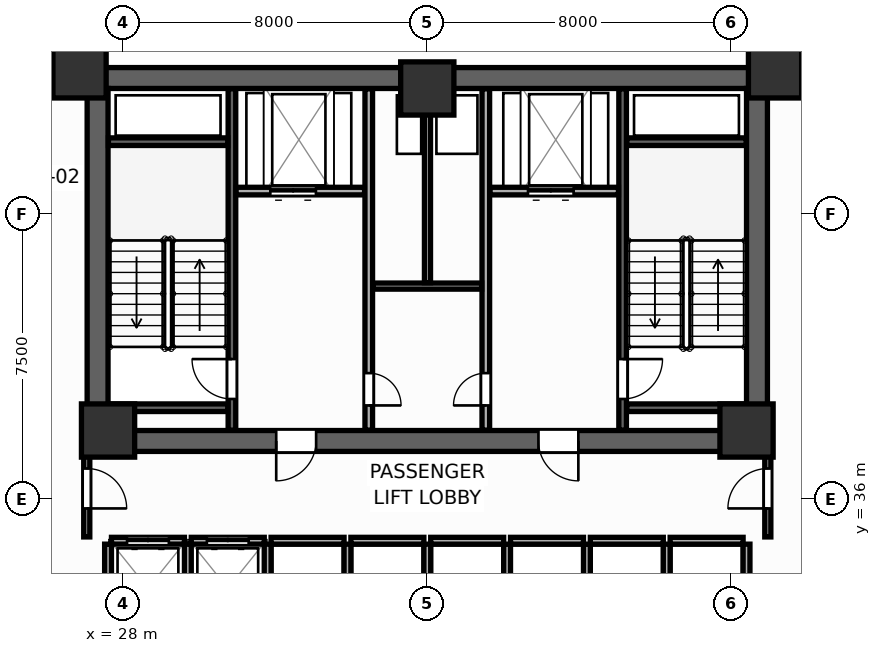
"""IFC4 building model, lengths in metres.
Left out: names, types, materials, properties, quantities, classifications, styles, units other than length and angle.
Written with IfcOpenShell. Run it as: python <this file> out.ifc"""

import sys

from ifc_helpers import new_model, si_unit, direction, frame, frame_2d, origin, origin_2d, place, context, subcontext, project, spatial, rectangle, extrude, source, transform, mapped, element, fill, save


model = new_model("IFC4")
c1 = context("Model", 3, precision=1e-05, world=origin(), true_north=direction((0.0, 1.0)))
c2 = subcontext(c1, "Body", "Model", "MODEL_VIEW")
j1 = project(units=[si_unit("LENGTHUNIT", "METRE"), si_unit("PLANEANGLEUNIT", "RADIAN")], contexts=[c1])
p1 = place(None, origin())
s1 = spatial("IfcSite", under=j1, at=p1, CompositionType="ELEMENT")
p2 = place(p1, origin())
s2 = spatial("IfcBuilding", under=s1, at=p2, CompositionType="ELEMENT")
p3 = place(p2, frame((0.0, 0.0, 43.5)))
s3 = spatial("IfcBuildingStorey", under=s2, at=p3, CompositionType="ELEMENT", Elevation=43.5)
p4 = place(p3, frame((27.05, 47.075, 0.0), z_axis=(0.0, 0.0, 1.0), x_axis=(1.0, 0.0, 0.0)))
e1 = element("IfcWall", 1, at=p4, inside=s3, PredefinedType="SHEAR", context=c2, shape_type="SweptSolid", body=[
    extrude(rectangle(XDim=17.9, YDim=0.55, at=frame_2d((8.95, 0.0))), origin(), (0.0, 0.0, 1.0), 3.9),
])
p5 = place(p3, frame((27.05, 37.525, 0.0), z_axis=(0.0, 0.0, 1.0), x_axis=(1.0, 0.0, 0.0)))
e2 = element("IfcWall", 2, at=p5, inside=s3, PredefinedType="SHEAR", context=c2, shape_type="SweptSolid", body=[
    extrude(rectangle(XDim=17.9, YDim=0.55, at=frame_2d((8.95, 0.0))), origin(), (0.0, 0.0, 1.0), 3.9),
])
p6 = place(p5, frame((4.975, 0.0, 0.0)))
e3 = element("IfcOpeningElement", 3, at=p6, cuts=e2, PredefinedType="OPENING", context=c2, shape_type="SweptSolid", body=[
    extrude(rectangle(XDim=1.05, YDim=2.1, at=frame_2d((0.525, 1.05))), frame((0.0, 0.285, 0.0), z_axis=(0.0, -1.0, 0.0), x_axis=(1.0, 0.0, 0.0)), (0.0, 0.0, 1.0), 0.57),
])
p7 = place(p5, frame((11.875, 0.0, 0.0)))
e4 = element("IfcOpeningElement", 4, at=p7, cuts=e2, PredefinedType="OPENING", context=c2, shape_type="SweptSolid", body=[
    extrude(rectangle(XDim=1.05, YDim=2.1, at=frame_2d((0.525, 1.05))), frame((0.0, 0.285, 0.0), z_axis=(0.0, -1.0, 0.0), x_axis=(1.0, 0.0, 0.0)), (0.0, 0.0, 1.0), 0.57),
])
for number, where, z_axis, x_axis in (
    (5, (27.325, 37.8, 0.0), (0.0, 0.0, 1.0), (0.0, 1.0, 0.0)),
    (6, (44.675, 37.8, 0.0), (0.0, 0.0, 1.0), (0.0, 1.0, 0.0)),
):
    element("IfcWall", number, at=place(p3, frame(where, z_axis=z_axis, x_axis=x_axis)), inside=s3, PredefinedType="SHEAR", context=c2, shape_type="SweptSolid", body=[
        extrude(rectangle(XDim=9.0, YDim=0.55, at=frame_2d((4.5, 0.0))), origin(), (0.0, 0.0, 1.0), 3.9),
    ])
m1 = source(origin(), c2, "Body", "SweptSolid", [
    extrude(rectangle(XDim=1.4, YDim=1.4, at=origin_2d()), origin(), (0.0, 0.0, 1.0), 3.9),
])
for number, where, z_axis, x_axis in (
    (7, (26.85, 47.25, 0.0), (0.0, 0.0, 1.0), (1.0, 0.0, 0.0)),
    (8, (45.15, 47.25, 0.0), (0.0, 0.0, 1.0), (1.0, 0.0, 0.0)),
    (9, (27.6, 37.8, 0.0), (0.0, 0.0, 1.0), (1.0, 0.0, 0.0)),
    (10, (44.4, 37.8, 0.0), (0.0, 0.0, 1.0), (1.0, 0.0, 0.0)),
    (11, (36.0, 46.8, 0.0), (0.0, 0.0, 1.0), (1.0, 0.0, 0.0)),
):
    element("IfcColumn", number, at=place(p3, frame(where, z_axis=z_axis, x_axis=x_axis)), inside=s3, PredefinedType="COLUMN", context=c2, shape_type="MappedRepresentation", body=[
        mapped(m1, transform((0.0, 0.0, 0.0), scale=1.0)),
    ])
p8 = place(p3, frame((30.86, 37.81, 0.0), z_axis=(0.0, 0.0, 1.0), x_axis=(0.0, 1.0, 0.0)))
e12 = element("IfcWall", 12, at=p8, inside=s3, PredefinedType="SHEAR", context=c2, shape_type="SweptSolid", body=[
    extrude(rectangle(XDim=8.98, YDim=0.2, at=frame_2d((4.49, 0.0))), origin(), (0.0, 0.0, 1.0), 3.9),
])
p9 = place(p8, frame((0.82, 0.0, 0.0)))
e13 = element("IfcOpeningElement", 13, at=p9, cuts=e12, PredefinedType="OPENING", context=c2, shape_type="SweptSolid", body=[
    extrude(rectangle(XDim=1.05, YDim=2.1, at=frame_2d((0.525, 1.05))), frame((0.0, 0.11, 0.0), z_axis=(0.0, -1.0, 0.0), x_axis=(1.0, 0.0, 0.0)), (0.0, 0.0, 1.0), 0.22),
])
for number, where, z_axis, x_axis in (
    (14, (27.61, 45.4, 0.0), (0.0, 0.0, 1.0), (1.0, 0.0, 0.0)),
    (15, (27.61, 38.4, 0.0), (0.0, 0.0, 1.0), (1.0, 0.0, 0.0)),
):
    element("IfcWall", number, at=place(p3, frame(where, z_axis=z_axis, x_axis=x_axis)), inside=s3, PredefinedType="SHEAR", context=c2, shape_type="SweptSolid", body=[
        extrude(rectangle(XDim=3.14, YDim=0.2, at=frame_2d((1.57, 0.0))), origin(), (0.0, 0.0, 1.0), 3.9),
    ])
p10 = place(p3, frame((41.14, 37.81, 0.0), z_axis=(0.0, 0.0, 1.0), x_axis=(0.0, 1.0, 0.0)))
e16 = element("IfcWall", 16, at=p10, inside=s3, PredefinedType="SHEAR", context=c2, shape_type="SweptSolid", body=[
    extrude(rectangle(XDim=8.98, YDim=0.2, at=frame_2d((4.49, 0.0))), origin(), (0.0, 0.0, 1.0), 3.9),
])
p11 = place(p10, frame((0.82, 0.0, 0.0)))
e17 = element("IfcOpeningElement", 17, at=p11, cuts=e16, PredefinedType="OPENING", context=c2, shape_type="SweptSolid", body=[
    extrude(rectangle(XDim=1.05, YDim=2.1, at=frame_2d((0.525, 1.05))), frame((0.0, 0.11, 0.0), z_axis=(0.0, -1.0, 0.0), x_axis=(1.0, 0.0, 0.0)), (0.0, 0.0, 1.0), 0.22),
])
for number, where, z_axis, x_axis in (
    (18, (41.25, 45.4, 0.0), (0.0, 0.0, 1.0), (1.0, 0.0, 0.0)),
    (19, (41.25, 38.4, 0.0), (0.0, 0.0, 1.0), (1.0, 0.0, 0.0)),
):
    element("IfcWall", number, at=place(p3, frame(where, z_axis=z_axis, x_axis=x_axis)), inside=s3, PredefinedType="SHEAR", context=c2, shape_type="SweptSolid", body=[
        extrude(rectangle(XDim=3.14, YDim=0.2, at=frame_2d((1.57, 0.0))), origin(), (0.0, 0.0, 1.0), 3.9),
    ])
p12 = place(p3, frame((30.97, 44.1, 0.0), z_axis=(0.0, 0.0, 1.0), x_axis=(1.0, 0.0, 0.0)))
e20 = element("IfcWall", 20, at=p12, inside=s3, PredefinedType="PARTITIONING", context=c2, shape_type="SweptSolid", body=[
    extrude(rectangle(XDim=3.38, YDim=0.2, at=frame_2d((1.69, 0.0))), origin(), (0.0, 0.0, 1.0), 3.68),
])
p13 = place(p12, frame((0.9, 0.0, 0.0)))
e21 = element("IfcOpeningElement", 21, at=p13, cuts=e20, PredefinedType="OPENING", context=c2, shape_type="SweptSolid", body=[
    extrude(rectangle(XDim=1.2, YDim=2.1, at=frame_2d((0.6, 1.05))), frame((0.0, 0.11, 0.0), z_axis=(0.0, -1.0, 0.0), x_axis=(1.0, 0.0, 0.0)), (0.0, 0.0, 1.0), 0.22),
])
p14 = place(p3, frame((37.65, 44.1, 0.0), z_axis=(0.0, 0.0, 1.0), x_axis=(1.0, 0.0, 0.0)))
e22 = element("IfcWall", 22, at=p14, inside=s3, PredefinedType="PARTITIONING", context=c2, shape_type="SweptSolid", body=[
    extrude(rectangle(XDim=3.38, YDim=0.2, at=frame_2d((1.69, 0.0))), origin(), (0.0, 0.0, 1.0), 3.68),
])
p15 = place(p14, frame((1.0, 0.0, 0.0)))
e23 = element("IfcOpeningElement", 23, at=p15, cuts=e22, PredefinedType="OPENING", context=c2, shape_type="SweptSolid", body=[
    extrude(rectangle(XDim=1.2, YDim=2.1, at=frame_2d((0.6, 1.05))), frame((0.0, 0.11, 0.0), z_axis=(0.0, -1.0, 0.0), x_axis=(1.0, 0.0, 0.0)), (0.0, 0.0, 1.0), 0.22),
])
p16 = place(p3, frame((34.46, 37.81, 0.0), z_axis=(0.0, 0.0, 1.0), x_axis=(0.0, 1.0, 0.0)))
e24 = element("IfcWall", 24, at=p16, inside=s3, PredefinedType="PARTITIONING", context=c2, shape_type="SweptSolid", body=[
    extrude(rectangle(XDim=8.98, YDim=0.2, at=frame_2d((4.49, 0.0))), origin(), (0.0, 0.0, 1.0), 3.68),
])
p17 = place(p16, frame((0.65, 0.0, 0.0)))
e25 = element("IfcOpeningElement", 25, at=p17, cuts=e24, PredefinedType="OPENING", context=c2, shape_type="SweptSolid", body=[
    extrude(rectangle(XDim=0.85, YDim=2.05, at=frame_2d((0.425, 1.025))), frame((0.0, 0.11, 0.0), z_axis=(0.0, -1.0, 0.0), x_axis=(1.0, 0.0, 0.0)), (0.0, 0.0, 1.0), 0.22),
])
p18 = place(p3, frame((37.54, 37.81, 0.0), z_axis=(0.0, 0.0, 1.0), x_axis=(0.0, 1.0, 0.0)))
e26 = element("IfcWall", 26, at=p18, inside=s3, PredefinedType="PARTITIONING", context=c2, shape_type="SweptSolid", body=[
    extrude(rectangle(XDim=8.98, YDim=0.2, at=frame_2d((4.49, 0.0))), origin(), (0.0, 0.0, 1.0), 3.68),
])
p19 = place(p18, frame((0.65, 0.0, 0.0)))
e27 = element("IfcOpeningElement", 27, at=p19, cuts=e26, PredefinedType="OPENING", context=c2, shape_type="SweptSolid", body=[
    extrude(rectangle(XDim=0.85, YDim=2.05, at=frame_2d((0.425, 1.025))), frame((0.0, 0.11, 0.0), z_axis=(0.0, -1.0, 0.0), x_axis=(1.0, 0.0, 0.0)), (0.0, 0.0, 1.0), 0.22),
])
p20 = place(p3, frame((34.57, 41.6, 0.0), z_axis=(0.0, 0.0, 1.0), x_axis=(1.0, 0.0, 0.0)))
e28 = element("IfcWall", 28, at=p20, inside=s3, PredefinedType="PARTITIONING", context=c2, shape_type="SweptSolid", body=[
    extrude(rectangle(XDim=2.86, YDim=0.16, at=frame_2d((1.43, 0.0))), origin(), (0.0, 0.0, 1.0), 3.68),
])
p21 = place(p3, frame((36.005, 41.69, 0.0), z_axis=(0.0, 0.0, 1.0), x_axis=(0.0, 1.0, 0.0)))
e29 = element("IfcWall", 29, at=p21, inside=s3, PredefinedType="PARTITIONING", context=c2, shape_type="SweptSolid", body=[
    extrude(rectangle(XDim=5.1, YDim=0.16, at=frame_2d((2.55, 0.0))), origin(), (0.0, 0.0, 1.0), 3.68),
])
p22 = place(p3, frame((27.69, 34.9, 0.0), z_axis=(0.0, 0.0, 1.0), x_axis=(1.0, 0.0, 0.0)))
e30 = element("IfcWall", 30, at=p22, inside=s3, PredefinedType="PARTITIONING", context=c2, shape_type="SweptSolid", body=[
    extrude(rectangle(XDim=1.92, YDim=0.18, at=frame_2d((0.96, 0.0))), origin(), (0.0, 0.0, 1.0), 3.68),
])
p23 = place(p22, frame((0.41, 0.0, 0.0)))
e31 = element("IfcOpeningElement", 31, at=p23, cuts=e30, PredefinedType="OPENING", context=c2, shape_type="SweptSolid", body=[
    extrude(rectangle(XDim=1.1, YDim=2.1, at=frame_2d((0.55, 1.05))), frame((0.0, 0.1, 0.0), z_axis=(0.0, -1.0, 0.0), x_axis=(1.0, 0.0, 0.0)), (0.0, 0.0, 1.0), 0.2),
])
p24 = place(p3, frame((27.6, 32.49, 0.0), z_axis=(0.0, 0.0, 1.0), x_axis=(0.0, 1.0, 0.0)))
e32 = element("IfcWall", 32, at=p24, inside=s3, PredefinedType="PARTITIONING", context=c2, shape_type="SweptSolid", body=[
    extrude(rectangle(XDim=2.32, YDim=0.18, at=frame_2d((1.16, 0.0))), origin(), (0.0, 0.0, 1.0), 3.68),
])
p25 = place(p3, frame((29.79, 34.9, 0.0), z_axis=(0.0, 0.0, 1.0), x_axis=(1.0, 0.0, 0.0)))
e33 = element("IfcWall", 33, at=p25, inside=s3, PredefinedType="PARTITIONING", context=c2, shape_type="SweptSolid", body=[
    extrude(rectangle(XDim=1.92, YDim=0.18, at=frame_2d((0.96, 0.0))), origin(), (0.0, 0.0, 1.0), 3.68),
])
p26 = place(p25, frame((0.41, 0.0, 0.0)))
e34 = element("IfcOpeningElement", 34, at=p26, cuts=e33, PredefinedType="OPENING", context=c2, shape_type="SweptSolid", body=[
    extrude(rectangle(XDim=1.1, YDim=2.1, at=frame_2d((0.55, 1.05))), frame((0.0, 0.1, 0.0), z_axis=(0.0, -1.0, 0.0), x_axis=(1.0, 0.0, 0.0)), (0.0, 0.0, 1.0), 0.2),
])
p27 = place(p3, frame((29.7, 32.49, 0.0), z_axis=(0.0, 0.0, 1.0), x_axis=(0.0, 1.0, 0.0)))
e35 = element("IfcWall", 35, at=p27, inside=s3, PredefinedType="PARTITIONING", context=c2, shape_type="SweptSolid", body=[
    extrude(rectangle(XDim=2.32, YDim=0.18, at=frame_2d((1.16, 0.0))), origin(), (0.0, 0.0, 1.0), 3.68),
])
p28 = place(p3, frame((31.89, 34.9, 0.0), z_axis=(0.0, 0.0, 1.0), x_axis=(1.0, 0.0, 0.0)))
e36 = element("IfcWall", 36, at=p28, inside=s3, PredefinedType="PARTITIONING", context=c2, shape_type="SweptSolid", body=[
    extrude(rectangle(XDim=1.92, YDim=0.18, at=frame_2d((0.96, 0.0))), origin(), (0.0, 0.0, 1.0), 3.68),
])
p29 = place(p3, frame((31.8, 32.49, 0.0), z_axis=(0.0, 0.0, 1.0), x_axis=(0.0, 1.0, 0.0)))
e37 = element("IfcWall", 37, at=p29, inside=s3, PredefinedType="PARTITIONING", context=c2, shape_type="SweptSolid", body=[
    extrude(rectangle(XDim=2.32, YDim=0.18, at=frame_2d((1.16, 0.0))), origin(), (0.0, 0.0, 1.0), 3.68),
])
p30 = place(p3, frame((33.99, 34.9, 0.0), z_axis=(0.0, 0.0, 1.0), x_axis=(1.0, 0.0, 0.0)))
e38 = element("IfcWall", 38, at=p30, inside=s3, PredefinedType="PARTITIONING", context=c2, shape_type="SweptSolid", body=[
    extrude(rectangle(XDim=1.92, YDim=0.18, at=frame_2d((0.96, 0.0))), origin(), (0.0, 0.0, 1.0), 3.68),
])
p31 = place(p3, frame((33.9, 32.49, 0.0), z_axis=(0.0, 0.0, 1.0), x_axis=(0.0, 1.0, 0.0)))
e39 = element("IfcWall", 39, at=p31, inside=s3, PredefinedType="PARTITIONING", context=c2, shape_type="SweptSolid", body=[
    extrude(rectangle(XDim=2.32, YDim=0.18, at=frame_2d((1.16, 0.0))), origin(), (0.0, 0.0, 1.0), 3.68),
])
p32 = place(p3, frame((36.09, 34.9, 0.0), z_axis=(0.0, 0.0, 1.0), x_axis=(1.0, 0.0, 0.0)))
e40 = element("IfcWall", 40, at=p32, inside=s3, PredefinedType="PARTITIONING", context=c2, shape_type="SweptSolid", body=[
    extrude(rectangle(XDim=1.92, YDim=0.18, at=frame_2d((0.96, 0.0))), origin(), (0.0, 0.0, 1.0), 3.68),
])
p33 = place(p3, frame((36.0, 32.49, 0.0), z_axis=(0.0, 0.0, 1.0), x_axis=(0.0, 1.0, 0.0)))
e41 = element("IfcWall", 41, at=p33, inside=s3, PredefinedType="PARTITIONING", context=c2, shape_type="SweptSolid", body=[
    extrude(rectangle(XDim=2.32, YDim=0.18, at=frame_2d((1.16, 0.0))), origin(), (0.0, 0.0, 1.0), 3.68),
])
p34 = place(p3, frame((38.19, 34.9, 0.0), z_axis=(0.0, 0.0, 1.0), x_axis=(1.0, 0.0, 0.0)))
e42 = element("IfcWall", 42, at=p34, inside=s3, PredefinedType="PARTITIONING", context=c2, shape_type="SweptSolid", body=[
    extrude(rectangle(XDim=1.92, YDim=0.18, at=frame_2d((0.96, 0.0))), origin(), (0.0, 0.0, 1.0), 3.68),
])
p35 = place(p3, frame((38.1, 32.49, 0.0), z_axis=(0.0, 0.0, 1.0), x_axis=(0.0, 1.0, 0.0)))
e43 = element("IfcWall", 43, at=p35, inside=s3, PredefinedType="PARTITIONING", context=c2, shape_type="SweptSolid", body=[
    extrude(rectangle(XDim=2.32, YDim=0.18, at=frame_2d((1.16, 0.0))), origin(), (0.0, 0.0, 1.0), 3.68),
])
p36 = place(p3, frame((40.29, 34.9, 0.0), z_axis=(0.0, 0.0, 1.0), x_axis=(1.0, 0.0, 0.0)))
e44 = element("IfcWall", 44, at=p36, inside=s3, PredefinedType="PARTITIONING", context=c2, shape_type="SweptSolid", body=[
    extrude(rectangle(XDim=1.92, YDim=0.18, at=frame_2d((0.96, 0.0))), origin(), (0.0, 0.0, 1.0), 3.68),
])
p37 = place(p3, frame((40.2, 32.49, 0.0), z_axis=(0.0, 0.0, 1.0), x_axis=(0.0, 1.0, 0.0)))
e45 = element("IfcWall", 45, at=p37, inside=s3, PredefinedType="PARTITIONING", context=c2, shape_type="SweptSolid", body=[
    extrude(rectangle(XDim=2.32, YDim=0.18, at=frame_2d((1.16, 0.0))), origin(), (0.0, 0.0, 1.0), 3.68),
])
p38 = place(p3, frame((42.39, 34.9, 0.0), z_axis=(0.0, 0.0, 1.0), x_axis=(1.0, 0.0, 0.0)))
e46 = element("IfcWall", 46, at=p38, inside=s3, PredefinedType="PARTITIONING", context=c2, shape_type="SweptSolid", body=[
    extrude(rectangle(XDim=1.92, YDim=0.18, at=frame_2d((0.96, 0.0))), origin(), (0.0, 0.0, 1.0), 3.68),
])
for number, where, z_axis, x_axis in (
    (47, (42.3, 32.49, 0.0), (0.0, 0.0, 1.0), (0.0, 1.0, 0.0)),
    (48, (44.4, 32.49, 0.0), (0.0, 0.0, 1.0), (0.0, 1.0, 0.0)),
):
    element("IfcWall", number, at=place(p3, frame(where, z_axis=z_axis, x_axis=x_axis)), inside=s3, PredefinedType="PARTITIONING", context=c2, shape_type="SweptSolid", body=[
        extrude(rectangle(XDim=2.32, YDim=0.18, at=frame_2d((1.16, 0.0))), origin(), (0.0, 0.0, 1.0), 3.68),
    ])
p39 = place(p3, frame((27.04, 35.0, 0.0), z_axis=(0.0, 0.0, 1.0), x_axis=(0.0, 1.0, 0.0)))
e49 = element("IfcWall", 49, at=p39, inside=s3, PredefinedType="PARTITIONING", context=c2, shape_type="SweptSolid", body=[
    extrude(rectangle(XDim=2.65, YDim=0.16, at=frame_2d((1.325, 0.0))), origin(), (0.0, 0.0, 1.0), 3.68),
])
p40 = place(p39, frame((0.75, 0.0, 0.0)))
e50 = element("IfcOpeningElement", 50, at=p40, cuts=e49, PredefinedType="OPENING", context=c2, shape_type="SweptSolid", body=[
    extrude(rectangle(XDim=1.05, YDim=2.1, at=frame_2d((0.525, 1.05))), frame((0.0, 0.09, 0.0), z_axis=(0.0, -1.0, 0.0), x_axis=(1.0, 0.0, 0.0)), (0.0, 0.0, 1.0), 0.18),
])
p41 = place(p3, frame((44.96, 35.0, 0.0), z_axis=(0.0, 0.0, 1.0), x_axis=(0.0, 1.0, 0.0)))
e51 = element("IfcWall", 51, at=p41, inside=s3, PredefinedType="PARTITIONING", context=c2, shape_type="SweptSolid", body=[
    extrude(rectangle(XDim=2.65, YDim=0.16, at=frame_2d((1.325, 0.0))), origin(), (0.0, 0.0, 1.0), 3.68),
])
p42 = place(p41, frame((0.75, 0.0, 0.0)))
e52 = element("IfcOpeningElement", 52, at=p42, cuts=e51, PredefinedType="OPENING", context=c2, shape_type="SweptSolid", body=[
    extrude(rectangle(XDim=1.05, YDim=2.1, at=frame_2d((0.525, 1.05))), frame((0.0, 0.09, 0.0), z_axis=(0.0, -1.0, 0.0), x_axis=(1.0, 0.0, 0.0)), (0.0, 0.0, 1.0), 0.18),
])
p43 = place(p3, frame((27.035, 47.34, 0.0), z_axis=(0.0, 0.0, 1.0), x_axis=(0.0, 1.0, 0.0)))
e53 = element("IfcWall", 53, at=p43, inside=s3, PredefinedType="PARTITIONING", context=c2, shape_type="SweptSolid", body=[
    extrude(rectangle(XDim=9.869, YDim=0.16, at=frame_2d((4.935, 0.0))), origin(), (0.0, 0.0, 1.0), 2.24),
])
p44 = place(p43, frame((4.354, 0.0, 0.0)))
e54 = element("IfcOpeningElement", 54, at=p44, cuts=e53, PredefinedType="OPENING", context=c2, shape_type="SweptSolid", body=[
    extrude(rectangle(XDim=0.95, YDim=2.05, at=frame_2d((0.475, 1.025))), frame((0.0, 0.09, 0.0), z_axis=(0.0, -1.0, 0.0), x_axis=(1.0, 0.0, 0.0)), (0.0, 0.0, 1.0), 0.18),
])
p45 = place(p3, frame((44.965, 47.34, 0.0), z_axis=(0.0, 0.0, 1.0), x_axis=(0.0, 1.0, 0.0)))
e55 = element("IfcWall", 55, at=p45, inside=s3, PredefinedType="PARTITIONING", context=c2, shape_type="SweptSolid", body=[
    extrude(rectangle(XDim=9.869, YDim=0.16, at=frame_2d((4.935, 0.0))), origin(), (0.0, 0.0, 1.0), 2.24),
])
p46 = place(p9, origin())
e56 = element("IfcDoor", 56, at=p46, inside=s3, OperationType="SINGLE_SWING_RIGHT", PredefinedType="DOOR", context=c2, shape_type="SweptSolid", body=[
    extrude(rectangle(XDim=1.05, YDim=2.1, at=frame_2d((0.525, 1.05))), frame((0.0, 0.025, 0.0), z_axis=(0.0, -1.0, 0.0), x_axis=(1.0, 0.0, 0.0)), (0.0, 0.0, 1.0), 0.05),
])
fill(e13, e56)
p47 = place(p11, frame((1.05, 0.0, 0.0), z_axis=(0.0, 0.0, 1.0), x_axis=(-1.0, 0.0, 0.0)))
e57 = element("IfcDoor", 57, at=p47, inside=s3, OperationType="SINGLE_SWING_LEFT", PredefinedType="DOOR", context=c2, shape_type="SweptSolid", body=[
    extrude(rectangle(XDim=1.05, YDim=2.1, at=frame_2d((0.525, 1.05))), frame((0.0, 0.025, 0.0), z_axis=(0.0, -1.0, 0.0), x_axis=(1.0, 0.0, 0.0)), (0.0, 0.0, 1.0), 0.05),
])
fill(e17, e57)
p48 = place(p13, origin())
e58 = element("IfcDoor", 58, at=p48, inside=s3, OperationType="DOUBLE_DOOR_SLIDING", PredefinedType="DOOR", context=c2, shape_type="SweptSolid", body=[
    extrude(rectangle(XDim=1.2, YDim=2.1, at=frame_2d((0.6, 1.05))), frame((0.0, 0.025, 0.0), z_axis=(0.0, -1.0, 0.0), x_axis=(1.0, 0.0, 0.0)), (0.0, 0.0, 1.0), 0.05),
])
fill(e21, e58)
p49 = place(p15, origin())
e59 = element("IfcDoor", 59, at=p49, inside=s3, OperationType="DOUBLE_DOOR_SLIDING", PredefinedType="DOOR", context=c2, shape_type="SweptSolid", body=[
    extrude(rectangle(XDim=1.2, YDim=2.1, at=frame_2d((0.6, 1.05))), frame((0.0, 0.025, 0.0), z_axis=(0.0, -1.0, 0.0), x_axis=(1.0, 0.0, 0.0)), (0.0, 0.0, 1.0), 0.05),
])
fill(e23, e59)
p50 = place(p17, frame((0.85, 0.0, 0.0), z_axis=(0.0, 0.0, 1.0), x_axis=(-1.0, 0.0, 0.0)))
e60 = element("IfcDoor", 60, at=p50, inside=s3, OperationType="SINGLE_SWING_RIGHT", PredefinedType="DOOR", context=c2, shape_type="SweptSolid", body=[
    extrude(rectangle(XDim=0.85, YDim=2.05, at=frame_2d((0.425, 1.025))), frame((0.0, 0.025, 0.0), z_axis=(0.0, -1.0, 0.0), x_axis=(1.0, 0.0, 0.0)), (0.0, 0.0, 1.0), 0.05),
])
fill(e25, e60)
p51 = place(p19, origin())
e61 = element("IfcDoor", 61, at=p51, inside=s3, OperationType="SINGLE_SWING_LEFT", PredefinedType="DOOR", context=c2, shape_type="SweptSolid", body=[
    extrude(rectangle(XDim=0.85, YDim=2.05, at=frame_2d((0.425, 1.025))), frame((0.0, 0.025, 0.0), z_axis=(0.0, -1.0, 0.0), x_axis=(1.0, 0.0, 0.0)), (0.0, 0.0, 1.0), 0.05),
])
fill(e27, e61)
p52 = place(p23, origin())
e62 = element("IfcDoor", 62, at=p52, inside=s3, OperationType="DOUBLE_DOOR_SLIDING", PredefinedType="DOOR", context=c2, shape_type="SweptSolid", body=[
    extrude(rectangle(XDim=1.1, YDim=2.1, at=frame_2d((0.55, 1.05))), frame((0.0, 0.025, 0.0), z_axis=(0.0, -1.0, 0.0), x_axis=(1.0, 0.0, 0.0)), (0.0, 0.0, 1.0), 0.05),
])
fill(e31, e62)
p53 = place(p26, origin())
e63 = element("IfcDoor", 63, at=p53, inside=s3, OperationType="DOUBLE_DOOR_SLIDING", PredefinedType="DOOR", context=c2, shape_type="SweptSolid", body=[
    extrude(rectangle(XDim=1.1, YDim=2.1, at=frame_2d((0.55, 1.05))), frame((0.0, 0.025, 0.0), z_axis=(0.0, -1.0, 0.0), x_axis=(1.0, 0.0, 0.0)), (0.0, 0.0, 1.0), 0.05),
])
fill(e34, e63)
p54 = place(p40, frame((1.05, 0.0, 0.0), z_axis=(0.0, 0.0, 1.0), x_axis=(-1.0, 0.0, 0.0)))
e64 = element("IfcDoor", 64, at=p54, inside=s3, OperationType="SINGLE_SWING_RIGHT", PredefinedType="DOOR", context=c2, shape_type="SweptSolid", body=[
    extrude(rectangle(XDim=1.05, YDim=2.1, at=frame_2d((0.525, 1.05))), frame((0.0, 0.025, 0.0), z_axis=(0.0, -1.0, 0.0), x_axis=(1.0, 0.0, 0.0)), (0.0, 0.0, 1.0), 0.05),
])
fill(e50, e64)
p55 = place(p42, origin())
e65 = element("IfcDoor", 65, at=p55, inside=s3, OperationType="SINGLE_SWING_LEFT", PredefinedType="DOOR", context=c2, shape_type="SweptSolid", body=[
    extrude(rectangle(XDim=1.05, YDim=2.1, at=frame_2d((0.525, 1.05))), frame((0.0, 0.025, 0.0), z_axis=(0.0, -1.0, 0.0), x_axis=(1.0, 0.0, 0.0)), (0.0, 0.0, 1.0), 0.05),
])
fill(e52, e65)
p56 = place(p6, frame((1.05, 0.0, 0.0), z_axis=(0.0, 0.0, 1.0), x_axis=(-1.0, 0.0, 0.0)))
e66 = element("IfcDoor", 66, at=p56, inside=s3, OperationType="SINGLE_SWING_RIGHT", PredefinedType="DOOR", context=c2, shape_type="SweptSolid", body=[
    extrude(rectangle(XDim=1.05, YDim=2.1, at=frame_2d((0.525, 1.05))), frame((0.0, 0.025, 0.0), z_axis=(0.0, -1.0, 0.0), x_axis=(1.0, 0.0, 0.0)), (0.0, 0.0, 1.0), 0.05),
])
fill(e3, e66)
p57 = place(p7, frame((1.05, 0.0, 0.0), z_axis=(0.0, 0.0, 1.0), x_axis=(-1.0, 0.0, 0.0)))
e67 = element("IfcDoor", 67, at=p57, inside=s3, OperationType="SINGLE_SWING_LEFT", PredefinedType="DOOR", context=c2, shape_type="SweptSolid", body=[
    extrude(rectangle(XDim=1.05, YDim=2.1, at=frame_2d((0.525, 1.05))), frame((0.0, 0.025, 0.0), z_axis=(0.0, -1.0, 0.0), x_axis=(1.0, 0.0, 0.0)), (0.0, 0.0, 1.0), 0.05),
])
fill(e4, e67)
save(model, sys.argv[1])
